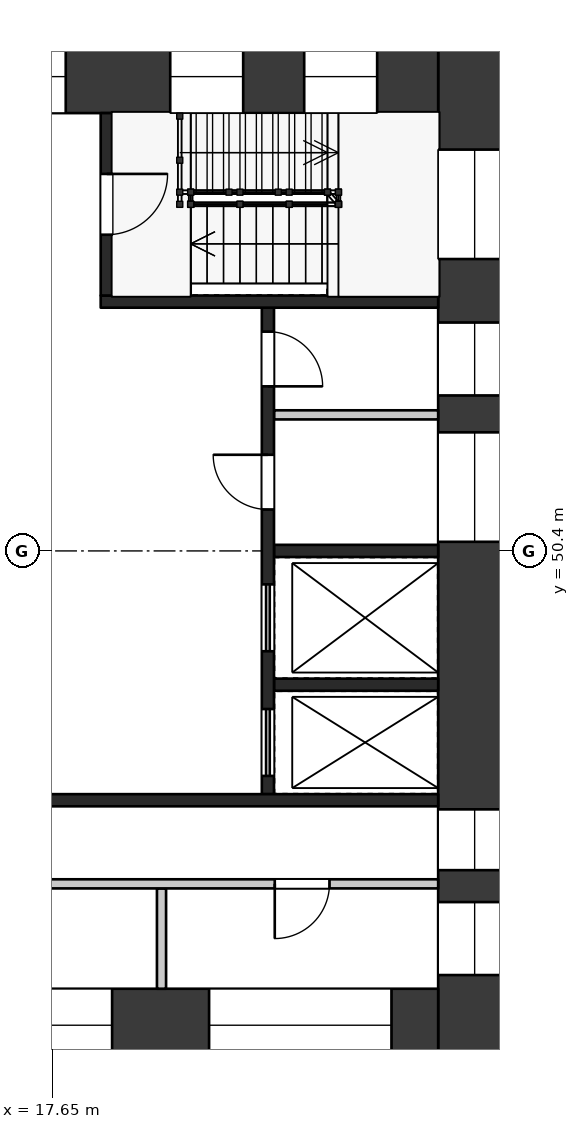
"""IFC4 building model, lengths in metres.
Left out: names, types, materials, properties, quantities, classifications, styles, units other than length and angle.
Written with IfcOpenShell. Run it as: python <this file> out.ifc"""

import sys

from ifc_helpers import new_model, si_unit, direction, frame, frame_2d, origin, origin_2d, place, context, subcontext, project, spatial, rectangle, extrude, element, fill, save


model = new_model("IFC4")
c1 = context("Model", 3, precision=1e-05, world=origin(), true_north=direction((0.0, 1.0)))
c2 = subcontext(c1, "Body", "Model", "MODEL_VIEW")
j1 = project(units=[si_unit("LENGTHUNIT", "METRE"), si_unit("PLANEANGLEUNIT", "RADIAN")], contexts=[c1])
p1 = place(None, origin())
s1 = spatial("IfcSite", under=j1, at=p1, CompositionType="ELEMENT")
p2 = place(p1, origin())
s2 = spatial("IfcBuilding", under=s1, at=p2, CompositionType="ELEMENT")
p3 = place(p2, frame((0.0, 0.0, 277.2)))
s3 = spatial("IfcBuildingStorey", under=s2, at=p3, CompositionType="ELEMENT", Elevation=277.2)
p4 = place(p3, frame((24.6, 58.8, 0.0), z_axis=(0.0, 0.0, 1.0), x_axis=(0.0, -1.0, 0.0)))
e1 = element("IfcWall", 1, at=p4, inside=s3, PredefinedType="SHEAR", context=c2, shape_type="SweptSolid", body=[
    extrude(rectangle(XDim=16.8, YDim=1.2, at=frame_2d((8.4, 0.0))), origin(), (0.0, 0.0, 1.0), 6.58),
])
p5 = place(p4, frame((1.8, 0.0, 0.5)))
e2 = element("IfcOpeningElement", 2, at=p5, cuts=e1, PredefinedType="OPENING", context=c2, shape_type="SweptSolid", body=[
    extrude(rectangle(XDim=1.8, YDim=2.4, at=frame_2d((0.9, 1.2))), frame((0.0, 0.61, 0.0), z_axis=(0.0, -1.0, 0.0), x_axis=(1.0, 0.0, 0.0)), (0.0, 0.0, 1.0), 1.22),
])
p6 = place(p4, frame((4.644, 0.0, 1.6)))
e3 = element("IfcOpeningElement", 3, at=p6, cuts=e1, PredefinedType="OPENING", context=c2, shape_type="SweptSolid", body=[
    extrude(rectangle(XDim=1.2, YDim=1.2, at=frame_2d((0.6, 0.6))), frame((0.0, 0.61, 0.0), z_axis=(0.0, -1.0, 0.0), x_axis=(1.0, 0.0, 0.0)), (0.0, 0.0, 1.0), 1.22),
])
p7 = place(p4, frame((6.45, 0.0, 1.6)))
e4 = element("IfcOpeningElement", 4, at=p7, cuts=e1, PredefinedType="OPENING", context=c2, shape_type="SweptSolid", body=[
    extrude(rectangle(XDim=1.8, YDim=1.2, at=frame_2d((0.9, 0.6))), frame((0.0, 0.61, 0.0), z_axis=(0.0, -1.0, 0.0), x_axis=(1.0, 0.0, 0.0)), (0.0, 0.0, 1.0), 1.22),
])
p8 = place(p4, frame((12.65, 0.0, 0.6)))
e5 = element("IfcOpeningElement", 5, at=p8, cuts=e1, PredefinedType="OPENING", context=c2, shape_type="SweptSolid", body=[
    extrude(rectangle(XDim=1.0, YDim=2.1, at=frame_2d((0.5, 1.05))), frame((0.0, 0.61, 0.0), z_axis=(0.0, -1.0, 0.0), x_axis=(1.0, 0.0, 0.0)), (0.0, 0.0, 1.0), 1.22),
])
p9 = place(p4, frame((14.175, 0.0, 1.6)))
e6 = element("IfcOpeningElement", 6, at=p9, cuts=e1, PredefinedType="OPENING", context=c2, shape_type="SweptSolid", body=[
    extrude(rectangle(XDim=1.2, YDim=1.2, at=frame_2d((0.6, 0.6))), frame((0.0, 0.61, 0.0), z_axis=(0.0, -1.0, 0.0), x_axis=(1.0, 0.0, 0.0)), (0.0, 0.0, 1.0), 1.22),
])
p10 = place(p3, frame((9.6, 58.2, 0.0), z_axis=(0.0, 0.0, 1.0), x_axis=(1.0, 0.0, 0.0)))
e7 = element("IfcWall", 7, at=p10, inside=s3, PredefinedType="SHEAR", context=c2, shape_type="SweptSolid", body=[
    extrude(rectangle(XDim=14.4, YDim=1.2, at=frame_2d((7.2, 0.0))), origin(), (0.0, 0.0, 1.0), 6.58),
])
p11 = place(p10, frame((1.105, 0.0, 0.6)))
e8 = element("IfcOpeningElement", 8, at=p11, cuts=e7, PredefinedType="OPENING", context=c2, shape_type="SweptSolid", body=[
    extrude(rectangle(XDim=3.0, YDim=2.1, at=frame_2d((1.5, 1.05))), frame((0.0, 0.61, 0.0), z_axis=(0.0, -1.0, 0.0), x_axis=(1.0, 0.0, 0.0)), (0.0, 0.0, 1.0), 1.22),
])
p12 = place(p10, frame((5.875, 0.0, 0.6)))
e9 = element("IfcOpeningElement", 9, at=p12, cuts=e7, PredefinedType="OPENING", context=c2, shape_type="SweptSolid", body=[
    extrude(rectangle(XDim=2.4, YDim=2.1, at=frame_2d((1.2, 1.05))), frame((0.0, 0.61, 0.0), z_axis=(0.0, -1.0, 0.0), x_axis=(1.0, 0.0, 0.0)), (0.0, 0.0, 1.0), 1.22),
])
p13 = place(p10, frame((9.993, 0.0, 0.5)))
e10 = element("IfcOpeningElement", 10, at=p13, cuts=e7, PredefinedType="OPENING", context=c2, shape_type="SweptSolid", body=[
    extrude(rectangle(XDim=1.2, YDim=2.4, at=frame_2d((0.6, 1.2))), frame((0.0, 0.61, 0.0), z_axis=(0.0, -1.0, 0.0), x_axis=(1.0, 0.0, 0.0)), (0.0, 0.0, 1.0), 1.22),
])
p14 = place(p10, frame((12.197, 0.0, 0.5)))
e11 = element("IfcOpeningElement", 11, at=p14, cuts=e7, PredefinedType="OPENING", context=c2, shape_type="SweptSolid", body=[
    extrude(rectangle(XDim=1.2, YDim=2.4, at=frame_2d((0.6, 1.2))), frame((0.0, 0.61, 0.0), z_axis=(0.0, -1.0, 0.0), x_axis=(1.0, 0.0, 0.0)), (0.0, 0.0, 1.0), 1.22),
])
p15 = place(p3, frame((9.6, 42.6, 0.0), z_axis=(0.0, 0.0, 1.0), x_axis=(1.0, 0.0, 0.0)))
e12 = element("IfcWall", 12, at=p15, inside=s3, PredefinedType="SHEAR", context=c2, shape_type="SweptSolid", body=[
    extrude(rectangle(XDim=14.4, YDim=1.2, at=frame_2d((7.2, 0.0))), origin(), (0.0, 0.0, 1.0), 6.58),
])
p16 = place(p15, frame((2.1, 0.0, 0.0)))
e13 = element("IfcOpeningElement", 13, at=p16, cuts=e12, PredefinedType="OPENING", context=c2, shape_type="SweptSolid", body=[
    extrude(rectangle(XDim=1.8, YDim=2.1, at=frame_2d((0.9, 1.05))), frame((0.0, 0.61, 0.0), z_axis=(0.0, -1.0, 0.0), x_axis=(1.0, 0.0, 0.0)), (0.0, 0.0, 1.0), 1.22),
])
p17 = place(p15, frame((6.038, 0.0, 1.6)))
e14 = element("IfcOpeningElement", 14, at=p17, cuts=e12, PredefinedType="OPENING", context=c2, shape_type="SweptSolid", body=[
    extrude(rectangle(XDim=3.0, YDim=1.2, at=frame_2d((1.5, 0.6))), frame((0.0, 0.61, 0.0), z_axis=(0.0, -1.0, 0.0), x_axis=(1.0, 0.0, 0.0)), (0.0, 0.0, 1.0), 1.22),
])
p18 = place(p15, frame((10.633, 0.0, 1.6)))
e15 = element("IfcOpeningElement", 15, at=p18, cuts=e12, PredefinedType="OPENING", context=c2, shape_type="SweptSolid", body=[
    extrude(rectangle(XDim=3.0, YDim=1.2, at=frame_2d((1.5, 0.6))), frame((0.0, 0.61, 0.0), z_axis=(0.0, -1.0, 0.0), x_axis=(1.0, 0.0, 0.0)), (0.0, 0.0, 1.0), 1.22),
])
for number, where, z_axis, x_axis in (
    (16, (21.3, 50.4, 0.0), (0.0, 0.0, 1.0), (1.0, 0.0, 0.0)),
    (17, (21.3, 48.2, 0.0), (0.0, 0.0, 1.0), (1.0, 0.0, 0.0)),
):
    element("IfcWall", number, at=place(p3, frame(where, z_axis=z_axis, x_axis=x_axis)), inside=s3, PredefinedType="SHEAR", context=c2, shape_type="SweptSolid", body=[
        extrude(rectangle(XDim=2.7, YDim=0.2, at=frame_2d((1.35, 0.0))), origin(), (0.0, 0.0, 1.0), 6.58),
    ])
p19 = place(p3, frame((21.3, 52.637, 0.0), z_axis=(0.0, 0.0, 1.0), x_axis=(1.0, 0.0, 0.0)))
e18 = element("IfcWall", 18, at=p19, inside=s3, PredefinedType="PARTITIONING", context=c2, shape_type="SweptSolid", body=[
    extrude(rectangle(XDim=2.7, YDim=0.15, at=frame_2d((1.35, 0.0))), origin(), (0.0, 0.0, 1.0), 6.58),
])
p20 = place(p3, frame((21.2, 54.4, 0.0), z_axis=(0.0, 0.0, 1.0), x_axis=(0.0, -1.0, 0.0)))
e19 = element("IfcWall", 19, at=p20, inside=s3, PredefinedType="SHEAR", context=c2, shape_type="SweptSolid", body=[
    extrude(rectangle(XDim=8.0, YDim=0.2, at=frame_2d((4.0, 0.0))), origin(), (0.0, 0.0, 1.0), 6.58),
])
p21 = place(p20, frame((0.394, 0.0, 0.0)))
e20 = element("IfcOpeningElement", 20, at=p21, cuts=e19, PredefinedType="OPENING", context=c2, shape_type="SweptSolid", body=[
    extrude(rectangle(XDim=0.9, YDim=2.1, at=frame_2d((0.45, 1.05))), frame((0.0, 0.11, 0.0), z_axis=(0.0, -1.0, 0.0), x_axis=(1.0, 0.0, 0.0)), (0.0, 0.0, 1.0), 0.22),
])
p22 = place(p20, frame((2.419, 0.0, 0.0)))
e21 = element("IfcOpeningElement", 21, at=p22, cuts=e19, PredefinedType="OPENING", context=c2, shape_type="SweptSolid", body=[
    extrude(rectangle(XDim=0.9, YDim=2.1, at=frame_2d((0.45, 1.05))), frame((0.0, 0.11, 0.0), z_axis=(0.0, -1.0, 0.0), x_axis=(1.0, 0.0, 0.0)), (0.0, 0.0, 1.0), 0.22),
])
p23 = place(p20, frame((4.55, 0.0, 0.0)))
e22 = element("IfcOpeningElement", 22, at=p23, cuts=e19, PredefinedType="OPENING", context=c2, shape_type="SweptSolid", body=[
    extrude(rectangle(XDim=1.1, YDim=2.1, at=frame_2d((0.55, 1.05))), frame((0.0, 0.11, 0.0), z_axis=(0.0, -1.0, 0.0), x_axis=(1.0, 0.0, 0.0)), (0.0, 0.0, 1.0), 0.22),
])
p24 = place(p20, frame((6.6, 0.0, 0.0)))
e23 = element("IfcOpeningElement", 23, at=p24, cuts=e19, PredefinedType="OPENING", context=c2, shape_type="SweptSolid", body=[
    extrude(rectangle(XDim=1.1, YDim=2.1, at=frame_2d((0.55, 1.05))), frame((0.0, 0.11, 0.0), z_axis=(0.0, -1.0, 0.0), x_axis=(1.0, 0.0, 0.0)), (0.0, 0.0, 1.0), 0.22),
])
p25 = place(p3, frame((18.45, 54.5, 0.0), z_axis=(0.0, 0.0, 1.0), x_axis=(1.0, 0.0, 0.0)))
e24 = element("IfcWall", 24, at=p25, inside=s3, PredefinedType="SHEAR", context=c2, shape_type="SweptSolid", body=[
    extrude(rectangle(XDim=5.55, YDim=0.2, at=frame_2d((2.775, 0.0))), origin(), (0.0, 0.0, 1.0), 6.58),
])
p26 = place(p3, frame((18.55, 57.6, 0.0), z_axis=(0.0, 0.0, 1.0), x_axis=(0.0, -1.0, 0.0)))
e25 = element("IfcWall", 25, at=p26, inside=s3, PredefinedType="SHEAR", context=c2, shape_type="SweptSolid", body=[
    extrude(rectangle(XDim=3.0, YDim=0.2, at=frame_2d((1.5, 0.0))), origin(), (0.0, 0.0, 1.0), 6.58),
])
p27 = place(p26, frame((1.0, 0.0, 0.0)))
e26 = element("IfcOpeningElement", 26, at=p27, cuts=e25, PredefinedType="OPENING", context=c2, shape_type="SweptSolid", body=[
    extrude(rectangle(XDim=1.0, YDim=2.1, at=frame_2d((0.5, 1.05))), frame((0.0, 0.11, 0.0), z_axis=(0.0, -1.0, 0.0), x_axis=(1.0, 0.0, 0.0)), (0.0, 0.0, 1.0), 0.22),
])
p28 = place(p3, frame((14.75, 46.3, 0.0), z_axis=(0.0, 0.0, 1.0), x_axis=(1.0, 0.0, 0.0)))
e27 = element("IfcWall", 27, at=p28, inside=s3, PredefinedType="SHEAR", context=c2, shape_type="SweptSolid", body=[
    extrude(rectangle(XDim=9.25, YDim=0.2, at=frame_2d((4.625, 0.0))), origin(), (0.0, 0.0, 1.0), 6.58),
])
p29 = place(p3, frame((19.45, 44.85, 0.0), z_axis=(0.0, 0.0, 1.0), x_axis=(0.0, -1.0, 0.0)))
e28 = element("IfcWall", 28, at=p29, inside=s3, PredefinedType="PARTITIONING", context=c2, shape_type="SweptSolid", body=[
    extrude(rectangle(XDim=1.65, YDim=0.15, at=frame_2d((0.825, 0.0))), origin(), (0.0, 0.0, 1.0), 6.58),
])
p30 = place(p3, frame((14.9, 44.925, 0.0), z_axis=(0.0, 0.0, 1.0), x_axis=(1.0, 0.0, 0.0)))
e29 = element("IfcWall", 29, at=p30, inside=s3, PredefinedType="PARTITIONING", context=c2, shape_type="SweptSolid", body=[
    extrude(rectangle(XDim=9.1, YDim=0.15, at=frame_2d((4.55, 0.0))), origin(), (0.0, 0.0, 1.0), 6.58),
])
p31 = place(p30, frame((1.788, 0.0, 0.0)))
e30 = element("IfcOpeningElement", 30, at=p31, cuts=e29, PredefinedType="OPENING", context=c2, shape_type="SweptSolid", body=[
    extrude(rectangle(XDim=0.9, YDim=2.1, at=frame_2d((0.45, 1.05))), frame((0.0, 0.085, 0.0), z_axis=(0.0, -1.0, 0.0), x_axis=(1.0, 0.0, 0.0)), (0.0, 0.0, 1.0), 0.17),
])
p32 = place(p30, frame((6.413, 0.0, 0.0)))
e31 = element("IfcOpeningElement", 31, at=p32, cuts=e29, PredefinedType="OPENING", context=c2, shape_type="SweptSolid", body=[
    extrude(rectangle(XDim=0.9, YDim=2.1, at=frame_2d((0.45, 1.05))), frame((0.0, 0.085, 0.0), z_axis=(0.0, -1.0, 0.0), x_axis=(1.0, 0.0, 0.0)), (0.0, 0.0, 1.0), 0.17),
])
p33 = place(p21, origin())
e32 = element("IfcDoor", 32, at=p33, inside=s3, OperationType="SINGLE_SWING_RIGHT", PredefinedType="DOOR", context=c2, shape_type="SweptSolid", body=[
    extrude(rectangle(XDim=0.9, YDim=2.1, at=frame_2d((0.45, 1.05))), frame((0.0, 0.025, 0.0), z_axis=(0.0, -1.0, 0.0), x_axis=(1.0, 0.0, 0.0)), (0.0, 0.0, 1.0), 0.05),
])
fill(e20, e32)
p34 = place(p22, frame((0.9, 0.0, 0.0), z_axis=(0.0, 0.0, 1.0), x_axis=(-1.0, 0.0, 0.0)))
e33 = element("IfcDoor", 33, at=p34, inside=s3, OperationType="SINGLE_SWING_RIGHT", PredefinedType="DOOR", context=c2, shape_type="SweptSolid", body=[
    extrude(rectangle(XDim=0.9, YDim=2.1, at=frame_2d((0.45, 1.05))), frame((0.0, 0.025, 0.0), z_axis=(0.0, -1.0, 0.0), x_axis=(1.0, 0.0, 0.0)), (0.0, 0.0, 1.0), 0.05),
])
fill(e21, e33)
p35 = place(p23, origin())
e34 = element("IfcDoor", 34, at=p35, inside=s3, OperationType="DOUBLE_DOOR_SLIDING", PredefinedType="DOOR", context=c2, shape_type="SweptSolid", body=[
    extrude(rectangle(XDim=1.1, YDim=2.1, at=frame_2d((0.55, 1.05))), frame((0.0, 0.025, 0.0), z_axis=(0.0, -1.0, 0.0), x_axis=(1.0, 0.0, 0.0)), (0.0, 0.0, 1.0), 0.05),
])
fill(e22, e34)
p36 = place(p24, origin())
e35 = element("IfcDoor", 35, at=p36, inside=s3, OperationType="DOUBLE_DOOR_SLIDING", PredefinedType="DOOR", context=c2, shape_type="SweptSolid", body=[
    extrude(rectangle(XDim=1.1, YDim=2.1, at=frame_2d((0.55, 1.05))), frame((0.0, 0.025, 0.0), z_axis=(0.0, -1.0, 0.0), x_axis=(1.0, 0.0, 0.0)), (0.0, 0.0, 1.0), 0.05),
])
fill(e23, e35)
p37 = place(p27, origin())
e36 = element("IfcDoor", 36, at=p37, inside=s3, OperationType="SINGLE_SWING_LEFT", PredefinedType="DOOR", context=c2, shape_type="SweptSolid", body=[
    extrude(rectangle(XDim=1.0, YDim=2.1, at=frame_2d((0.5, 1.05))), frame((0.0, 0.025, 0.0), z_axis=(0.0, -1.0, 0.0), x_axis=(1.0, 0.0, 0.0)), (0.0, 0.0, 1.0), 0.05),
])
fill(e26, e36)
p38 = place(p32, frame((0.9, 0.0, 0.0), z_axis=(0.0, 0.0, 1.0), x_axis=(-1.0, 0.0, 0.0)))
e37 = element("IfcDoor", 37, at=p38, inside=s3, OperationType="SINGLE_SWING_RIGHT", PredefinedType="DOOR", context=c2, shape_type="SweptSolid", body=[
    extrude(rectangle(XDim=0.9, YDim=2.1, at=frame_2d((0.45, 1.05))), frame((0.0, 0.025, 0.0), z_axis=(0.0, -1.0, 0.0), x_axis=(1.0, 0.0, 0.0)), (0.0, 0.0, 1.0), 0.05),
])
fill(e31, e37)
p39 = place(p5, origin())
e38 = element("IfcWindow", 38, at=p39, inside=s3, PartitioningType="SINGLE_PANEL", PredefinedType="WINDOW", context=c2, shape_type="SweptSolid", body=[
    extrude(rectangle(XDim=1.8, YDim=2.4, at=frame_2d((0.9, 1.2))), frame((0.0, 0.03, 0.0), z_axis=(0.0, -1.0, 0.0), x_axis=(1.0, 0.0, 0.0)), (0.0, 0.0, 1.0), 0.06),
])
fill(e2, e38)
p40 = place(p6, origin())
e39 = element("IfcWindow", 39, at=p40, inside=s3, PartitioningType="SINGLE_PANEL", PredefinedType="WINDOW", context=c2, shape_type="SweptSolid", body=[
    extrude(rectangle(XDim=1.2, YDim=1.2, at=frame_2d((0.6, 0.6))), frame((0.0, 0.03, 0.0), z_axis=(0.0, -1.0, 0.0), x_axis=(1.0, 0.0, 0.0)), (0.0, 0.0, 1.0), 0.06),
])
fill(e3, e39)
p41 = place(p7, origin())
e40 = element("IfcWindow", 40, at=p41, inside=s3, PartitioningType="SINGLE_PANEL", PredefinedType="WINDOW", context=c2, shape_type="SweptSolid", body=[
    extrude(rectangle(XDim=1.8, YDim=1.2, at=frame_2d((0.9, 0.6))), frame((0.0, 0.03, 0.0), z_axis=(0.0, -1.0, 0.0), x_axis=(1.0, 0.0, 0.0)), (0.0, 0.0, 1.0), 0.06),
])
fill(e4, e40)
p42 = place(p8, origin())
e41 = element("IfcWindow", 41, at=p42, inside=s3, PartitioningType="SINGLE_PANEL", PredefinedType="WINDOW", context=c2, shape_type="SweptSolid", body=[
    extrude(rectangle(XDim=1.0, YDim=2.1, at=frame_2d((0.5, 1.05))), frame((0.0, 0.03, 0.0), z_axis=(0.0, -1.0, 0.0), x_axis=(1.0, 0.0, 0.0)), (0.0, 0.0, 1.0), 0.06),
])
fill(e5, e41)
p43 = place(p9, origin())
e42 = element("IfcWindow", 42, at=p43, inside=s3, PartitioningType="SINGLE_PANEL", PredefinedType="WINDOW", context=c2, shape_type="SweptSolid", body=[
    extrude(rectangle(XDim=1.2, YDim=1.2, at=frame_2d((0.6, 0.6))), frame((0.0, 0.03, 0.0), z_axis=(0.0, -1.0, 0.0), x_axis=(1.0, 0.0, 0.0)), (0.0, 0.0, 1.0), 0.06),
])
fill(e6, e42)
p44 = place(p12, origin())
e43 = element("IfcWindow", 43, at=p44, inside=s3, PartitioningType="SINGLE_PANEL", PredefinedType="WINDOW", context=c2, shape_type="SweptSolid", body=[
    extrude(rectangle(XDim=2.4, YDim=2.1, at=frame_2d((1.2, 1.05))), frame((0.0, 0.03, 0.0), z_axis=(0.0, -1.0, 0.0), x_axis=(1.0, 0.0, 0.0)), (0.0, 0.0, 1.0), 0.06),
])
fill(e9, e43)
p45 = place(p13, origin())
e44 = element("IfcWindow", 44, at=p45, inside=s3, PartitioningType="SINGLE_PANEL", PredefinedType="WINDOW", context=c2, shape_type="SweptSolid", body=[
    extrude(rectangle(XDim=1.2, YDim=2.4, at=frame_2d((0.6, 1.2))), frame((0.0, 0.03, 0.0), z_axis=(0.0, -1.0, 0.0), x_axis=(1.0, 0.0, 0.0)), (0.0, 0.0, 1.0), 0.06),
])
fill(e10, e44)
p46 = place(p14, origin())
e45 = element("IfcWindow", 45, at=p46, inside=s3, PartitioningType="SINGLE_PANEL", PredefinedType="WINDOW", context=c2, shape_type="SweptSolid", body=[
    extrude(rectangle(XDim=1.2, YDim=2.4, at=frame_2d((0.6, 1.2))), frame((0.0, 0.03, 0.0), z_axis=(0.0, -1.0, 0.0), x_axis=(1.0, 0.0, 0.0)), (0.0, 0.0, 1.0), 0.06),
])
fill(e11, e45)
p47 = place(p17, origin())
e46 = element("IfcWindow", 46, at=p47, inside=s3, PartitioningType="SINGLE_PANEL", PredefinedType="WINDOW", context=c2, shape_type="SweptSolid", body=[
    extrude(rectangle(XDim=3.0, YDim=1.2, at=frame_2d((1.5, 0.6))), frame((0.0, 0.03, 0.0), z_axis=(0.0, -1.0, 0.0), x_axis=(1.0, 0.0, 0.0)), (0.0, 0.0, 1.0), 0.06),
])
fill(e14, e46)
p48 = place(p18, origin())
e47 = element("IfcWindow", 47, at=p48, inside=s3, PartitioningType="SINGLE_PANEL", PredefinedType="WINDOW", context=c2, shape_type="SweptSolid", body=[
    extrude(rectangle(XDim=3.0, YDim=1.2, at=frame_2d((1.5, 0.6))), frame((0.0, 0.03, 0.0), z_axis=(0.0, -1.0, 0.0), x_axis=(1.0, 0.0, 0.0)), (0.0, 0.0, 1.0), 0.06),
])
fill(e15, e47)
p49 = place(p2, frame((0.0, 0.0, 287.45)))
p50 = place(p49, frame((0.0, 0.0, 1.95)))
p51 = place(p50, frame((22.65, 47.25, 0.0)))
p52 = place(p51, frame((0.0, 0.0, 0.2)))
e48 = element("IfcWindow", 48, at=p52, inside=s3, PartitioningType="SINGLE_PANEL", PredefinedType="SKYLIGHT", context=c2, shape_type="SweptSolid", body=[
    extrude(rectangle(XDim=0.9, YDim=0.9, at=origin_2d()), origin(), (0.0, 0.0, 1.0), 0.05),
])
save(model, sys.argv[1])
